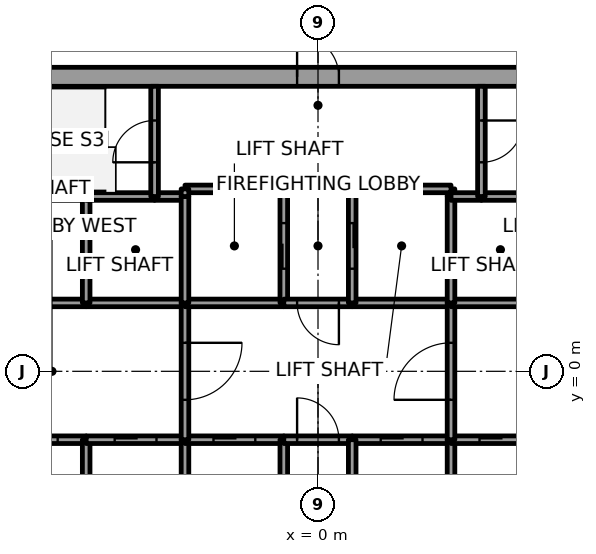
"""IFC4 building model, lengths in metres.
Left out: names, types, materials, properties, quantities, classifications, styles, units other than length and angle.
Written with IfcOpenShell. Run it as: python <this file> out.ifc"""

import sys

from ifc_helpers import new_model, si_unit, direction, frame, frame_2d, origin, place, context, subcontext, project, spatial, rectangle, extrude, element, fill, save


model = new_model("IFC4")
c1 = context("Model", 3, precision=1e-05, world=origin(), true_north=direction((0.0, 1.0)))
c2 = subcontext(c1, "Body", "Model", "MODEL_VIEW")
j1 = project(units=[si_unit("LENGTHUNIT", "METRE"), si_unit("PLANEANGLEUNIT", "RADIAN")], contexts=[c1])
p1 = place(None, origin())
s1 = spatial("IfcSite", under=j1, at=p1, CompositionType="ELEMENT")
p2 = place(p1, origin())
s2 = spatial("IfcBuilding", under=s1, at=p2, CompositionType="ELEMENT")
p3 = place(p2, frame((0.0, 0.0, 177.8)))
s3 = spatial("IfcBuildingStorey", under=s2, at=p3, CompositionType="ELEMENT", Elevation=177.8)
p4 = place(p3, frame((-11.0, 7.75, 0.0), z_axis=(0.0, 0.0, 1.0), x_axis=(1.0, 0.0, 0.0)))
e1 = element("IfcWall", 1, at=p4, inside=s3, PredefinedType="SHEAR", context=c2, shape_type="SweptSolid", body=[
    extrude(rectangle(XDim=22.0, YDim=0.5, at=frame_2d((11.0, 0.0))), origin(), (0.0, 0.0, 1.0), 4.0),
])
p5 = place(p4, frame((10.45, 0.0, 0.0)))
e2 = element("IfcOpeningElement", 2, at=p5, cuts=e1, PredefinedType="OPENING", context=c2, shape_type="SweptSolid", body=[
    extrude(rectangle(XDim=1.1, YDim=2.1, at=frame_2d((0.55, 1.05))), frame((0.0, 0.25, 0.0), z_axis=(0.0, -1.0, 0.0), x_axis=(1.0, 0.0, 0.0)), (0.0, 0.0, 1.0), 0.5),
])
p6 = place(p3, frame((-8.7, -1.8, 0.0), z_axis=(0.0, 0.0, 1.0), x_axis=(1.0, 0.0, 0.0)))
e3 = element("IfcWall", 3, at=p6, inside=s3, PredefinedType="SOLIDWALL", context=c2, shape_type="SweptSolid", body=[
    extrude(rectangle(XDim=2.6, YDim=0.2, at=frame_2d((1.3, 0.0))), origin(), (0.0, 0.0, 1.0), 3.85),
])
p7 = place(p6, frame((0.75, 0.0, 0.0)))
e4 = element("IfcOpeningElement", 4, at=p7, cuts=e3, PredefinedType="OPENING", context=c2, shape_type="SweptSolid", body=[
    extrude(rectangle(XDim=1.1, YDim=2.1, at=frame_2d((0.55, 1.05))), frame((0.0, 0.1, 0.0), z_axis=(0.0, -1.0, 0.0), x_axis=(1.0, 0.0, 0.0)), (0.0, 0.0, 1.0), 0.2),
])
for number, where, z_axis, x_axis in (
    (5, (-6.1, 1.8, 0.0), (0.0, 0.0, 1.0), (-1.0, 0.0, 0.0)),
    (6, (-6.1, 4.6, 0.0), (0.0, 0.0, 1.0), (-1.0, 0.0, 0.0)),
):
    element("IfcWall", number, at=place(p3, frame(where, z_axis=z_axis, x_axis=x_axis)), inside=s3, PredefinedType="SOLIDWALL", context=c2, shape_type="SweptSolid", body=[
        extrude(rectangle(XDim=2.6, YDim=0.2, at=frame_2d((1.3, 0.0))), origin(), (0.0, 0.0, 1.0), 3.85),
    ])
p8 = place(p3, frame((-6.1, -4.6, 0.0), z_axis=(0.0, 0.0, 1.0), x_axis=(0.0, 1.0, 0.0)))
e7 = element("IfcWall", 7, at=p8, inside=s3, PredefinedType="SOLIDWALL", context=c2, shape_type="SweptSolid", body=[
    extrude(rectangle(XDim=2.8, YDim=0.2, at=frame_2d((1.4, 0.0))), origin(), (0.0, 0.0, 1.0), 3.85),
])
p9 = place(p3, frame((-6.1, -1.8, 0.0), z_axis=(0.0, 0.0, 1.0), x_axis=(1.0, 0.0, 0.0)))
e8 = element("IfcWall", 8, at=p9, inside=s3, PredefinedType="SOLIDWALL", context=c2, shape_type="SweptSolid", body=[
    extrude(rectangle(XDim=2.6, YDim=0.2, at=frame_2d((1.3, 0.0))), origin(), (0.0, 0.0, 1.0), 3.85),
])
p10 = place(p9, frame((0.75, 0.0, 0.0)))
e9 = element("IfcOpeningElement", 9, at=p10, cuts=e8, PredefinedType="OPENING", context=c2, shape_type="SweptSolid", body=[
    extrude(rectangle(XDim=1.1, YDim=2.1, at=frame_2d((0.55, 1.05))), frame((0.0, 0.1, 0.0), z_axis=(0.0, -1.0, 0.0), x_axis=(1.0, 0.0, 0.0)), (0.0, 0.0, 1.0), 0.2),
])
p11 = place(p3, frame((-3.5, 1.8, 0.0), z_axis=(0.0, 0.0, 1.0), x_axis=(-1.0, 0.0, 0.0)))
e10 = element("IfcWall", 10, at=p11, inside=s3, PredefinedType="SOLIDWALL", context=c2, shape_type="SweptSolid", body=[
    extrude(rectangle(XDim=2.6, YDim=0.2, at=frame_2d((1.3, 0.0))), origin(), (0.0, 0.0, 1.0), 3.85),
])
p12 = place(p3, frame((-6.1, 1.8, 0.0), z_axis=(0.0, 0.0, 1.0), x_axis=(0.0, 1.0, 0.0)))
e11 = element("IfcWall", 11, at=p12, inside=s3, PredefinedType="SOLIDWALL", context=c2, shape_type="SweptSolid", body=[
    extrude(rectangle(XDim=2.8, YDim=0.2, at=frame_2d((1.4, 0.0))), origin(), (0.0, 0.0, 1.0), 3.85),
])
p13 = place(p3, frame((-4.3, 4.6, 0.0), z_axis=(0.0, 0.0, 1.0), x_axis=(-1.0, 0.0, 0.0)))
e12 = element("IfcWall", 12, at=p13, inside=s3, PredefinedType="SOLIDWALL", context=c2, shape_type="SweptSolid", body=[
    extrude(rectangle(XDim=1.8, YDim=0.2, at=frame_2d((0.9, 0.0))), origin(), (0.0, 0.0, 1.0), 3.85),
])
p14 = place(p3, frame((-3.5, 4.6, 0.0), z_axis=(0.0, 0.0, 1.0), x_axis=(-1.0, 0.0, 0.0)))
e13 = element("IfcWall", 13, at=p14, inside=s3, PredefinedType="SOLIDWALL", context=c2, shape_type="SweptSolid", body=[
    extrude(rectangle(XDim=0.8, YDim=0.2, at=frame_2d((0.4, 0.0))), origin(), (0.0, 0.0, 1.0), 3.85),
])
p15 = place(p3, frame((-4.3, 4.6, 0.0), z_axis=(0.0, 0.0, 1.0), x_axis=(0.0, 1.0, 0.0)))
e14 = element("IfcWall", 14, at=p15, inside=s3, PredefinedType="SOLIDWALL", context=c2, shape_type="SweptSolid", body=[
    extrude(rectangle(XDim=2.9, YDim=0.2, at=frame_2d((1.45, 0.0))), origin(), (0.0, 0.0, 1.0), 3.85),
])
p16 = place(p15, frame((0.9, 0.0, 0.0)))
e15 = element("IfcOpeningElement", 15, at=p16, cuts=e14, PredefinedType="OPENING", context=c2, shape_type="SweptSolid", body=[
    extrude(rectangle(XDim=1.1, YDim=2.1, at=frame_2d((0.55, 1.05))), frame((0.0, 0.1, 0.0), z_axis=(0.0, -1.0, 0.0), x_axis=(1.0, 0.0, 0.0)), (0.0, 0.0, 1.0), 0.2),
])
p17 = place(p3, frame((-3.5, -4.6, 0.0), z_axis=(0.0, 0.0, 1.0), x_axis=(0.0, 1.0, 0.0)))
e16 = element("IfcWall", 16, at=p17, inside=s3, PredefinedType="SOLIDWALL", context=c2, shape_type="SweptSolid", body=[
    extrude(rectangle(XDim=2.8, YDim=0.2, at=frame_2d((1.4, 0.0))), origin(), (0.0, 0.0, 1.0), 3.85),
])
p18 = place(p3, frame((-3.5, -1.8, 0.0), z_axis=(0.0, 0.0, 1.0), x_axis=(1.0, 0.0, 0.0)))
e17 = element("IfcWall", 17, at=p18, inside=s3, PredefinedType="SOLIDWALL", context=c2, shape_type="SweptSolid", body=[
    extrude(rectangle(XDim=2.6, YDim=0.2, at=frame_2d((1.3, 0.0))), origin(), (0.0, 0.0, 1.0), 3.85),
])
p19 = place(p18, frame((0.75, 0.0, 0.0)))
e18 = element("IfcOpeningElement", 18, at=p19, cuts=e17, PredefinedType="OPENING", context=c2, shape_type="SweptSolid", body=[
    extrude(rectangle(XDim=1.1, YDim=2.1, at=frame_2d((0.55, 1.05))), frame((0.0, 0.1, 0.0), z_axis=(0.0, -1.0, 0.0), x_axis=(1.0, 0.0, 0.0)), (0.0, 0.0, 1.0), 0.2),
])
p20 = place(p3, frame((-3.5, 1.8, 0.0), z_axis=(0.0, 0.0, 1.0), x_axis=(0.0, -1.0, 0.0)))
e19 = element("IfcWall", 19, at=p20, inside=s3, PredefinedType="SOLIDWALL", context=c2, shape_type="SweptSolid", body=[
    extrude(rectangle(XDim=3.6, YDim=0.2, at=frame_2d((1.8, 0.0))), origin(), (0.0, 0.0, 1.0), 3.85),
])
p21 = place(p20, frame((1.05, 0.0, 0.0)))
e20 = element("IfcOpeningElement", 20, at=p21, cuts=e19, PredefinedType="OPENING", context=c2, shape_type="SweptSolid", body=[
    extrude(rectangle(XDim=1.5, YDim=2.1, at=frame_2d((0.75, 1.05))), frame((0.0, 0.1, 0.0), z_axis=(0.0, -1.0, 0.0), x_axis=(1.0, 0.0, 0.0)), (0.0, 0.0, 1.0), 0.2),
])
p22 = place(p3, frame((-0.9, 1.8, 0.0), z_axis=(0.0, 0.0, 1.0), x_axis=(-1.0, 0.0, 0.0)))
e21 = element("IfcWall", 21, at=p22, inside=s3, PredefinedType="SOLIDWALL", context=c2, shape_type="SweptSolid", body=[
    extrude(rectangle(XDim=2.6, YDim=0.2, at=frame_2d((1.3, 0.0))), origin(), (0.0, 0.0, 1.0), 3.85),
])
p23 = place(p3, frame((-3.5, 4.6, 0.0), z_axis=(0.0, 0.0, 1.0), x_axis=(0.0, -1.0, 0.0)))
e22 = element("IfcWall", 22, at=p23, inside=s3, PredefinedType="SOLIDWALL", context=c2, shape_type="SweptSolid", body=[
    extrude(rectangle(XDim=2.8, YDim=0.2, at=frame_2d((1.4, 0.0))), origin(), (0.0, 0.0, 1.0), 3.85),
])
p24 = place(p3, frame((-0.9, 1.8, 0.0), z_axis=(0.0, 0.0, 1.0), x_axis=(0.0, 1.0, 0.0)))
e23 = element("IfcWall", 23, at=p24, inside=s3, PredefinedType="SOLIDWALL", context=c2, shape_type="SweptSolid", body=[
    extrude(rectangle(XDim=3.0, YDim=0.2, at=frame_2d((1.5, 0.0))), origin(), (0.0, 0.0, 1.0), 3.85),
])
p25 = place(p24, frame((0.9, 0.0, 0.0)))
e24 = element("IfcOpeningElement", 24, at=p25, cuts=e23, PredefinedType="OPENING", context=c2, shape_type="SweptSolid", body=[
    extrude(rectangle(XDim=1.2, YDim=2.1, at=frame_2d((0.6, 1.05))), frame((0.0, 0.1, 0.0), z_axis=(0.0, -1.0, 0.0), x_axis=(1.0, 0.0, 0.0)), (0.0, 0.0, 1.0), 0.2),
])
p26 = place(p3, frame((-0.9, 4.8, 0.0), z_axis=(0.0, 0.0, 1.0), x_axis=(-1.0, 0.0, 0.0)))
e25 = element("IfcWall", 25, at=p26, inside=s3, PredefinedType="SOLIDWALL", context=c2, shape_type="SweptSolid", body=[
    extrude(rectangle(XDim=2.6, YDim=0.2, at=frame_2d((1.3, 0.0))), origin(), (0.0, 0.0, 1.0), 3.85),
])
p27 = place(p3, frame((-3.5, 4.8, 0.0), z_axis=(0.0, 0.0, 1.0), x_axis=(0.0, -1.0, 0.0)))
e26 = element("IfcWall", 26, at=p27, inside=s3, PredefinedType="SOLIDWALL", context=c2, shape_type="SweptSolid", body=[
    extrude(rectangle(XDim=0.2, YDim=0.2, at=frame_2d((0.1, 0.0))), origin(), (0.0, 0.0, 1.0), 3.85),
])
p28 = place(p3, frame((-0.9, -4.6, 0.0), z_axis=(0.0, 0.0, 1.0), x_axis=(0.0, 1.0, 0.0)))
e27 = element("IfcWall", 27, at=p28, inside=s3, PredefinedType="SOLIDWALL", context=c2, shape_type="SweptSolid", body=[
    extrude(rectangle(XDim=2.8, YDim=0.2, at=frame_2d((1.4, 0.0))), origin(), (0.0, 0.0, 1.0), 3.85),
])
p29 = place(p3, frame((-0.9, -1.8, 0.0), z_axis=(0.0, 0.0, 1.0), x_axis=(1.0, 0.0, 0.0)))
e28 = element("IfcWall", 28, at=p29, inside=s3, PredefinedType="SOLIDWALL", context=c2, shape_type="SweptSolid", body=[
    extrude(rectangle(XDim=1.8, YDim=0.2, at=frame_2d((0.9, 0.0))), origin(), (0.0, 0.0, 1.0), 3.85),
])
p30 = place(p29, frame((0.35, 0.0, 0.0)))
e29 = element("IfcOpeningElement", 29, at=p30, cuts=e28, PredefinedType="OPENING", context=c2, shape_type="SweptSolid", body=[
    extrude(rectangle(XDim=1.1, YDim=2.1, at=frame_2d((0.55, 1.05))), frame((0.0, 0.1, 0.0), z_axis=(0.0, -1.0, 0.0), x_axis=(1.0, 0.0, 0.0)), (0.0, 0.0, 1.0), 0.2),
])
p31 = place(p3, frame((0.9, 1.8, 0.0), z_axis=(0.0, 0.0, 1.0), x_axis=(-1.0, 0.0, 0.0)))
e30 = element("IfcWall", 30, at=p31, inside=s3, PredefinedType="SOLIDWALL", context=c2, shape_type="SweptSolid", body=[
    extrude(rectangle(XDim=1.8, YDim=0.2, at=frame_2d((0.9, 0.0))), origin(), (0.0, 0.0, 1.0), 3.85),
])
p32 = place(p31, frame((0.35, 0.0, 0.0)))
e31 = element("IfcOpeningElement", 31, at=p32, cuts=e30, PredefinedType="OPENING", context=c2, shape_type="SweptSolid", body=[
    extrude(rectangle(XDim=1.1, YDim=2.1, at=frame_2d((0.55, 1.05))), frame((0.0, 0.1, 0.0), z_axis=(0.0, -1.0, 0.0), x_axis=(1.0, 0.0, 0.0)), (0.0, 0.0, 1.0), 0.2),
])
p33 = place(p3, frame((0.9, -1.8, 0.0), z_axis=(0.0, 0.0, 1.0), x_axis=(1.0, 0.0, 0.0)))
e32 = element("IfcWall", 32, at=p33, inside=s3, PredefinedType="SOLIDWALL", context=c2, shape_type="SweptSolid", body=[
    extrude(rectangle(XDim=2.6, YDim=0.2, at=frame_2d((1.3, 0.0))), origin(), (0.0, 0.0, 1.0), 3.85),
])
p34 = place(p33, frame((0.75, 0.0, 0.0)))
e33 = element("IfcOpeningElement", 33, at=p34, cuts=e32, PredefinedType="OPENING", context=c2, shape_type="SweptSolid", body=[
    extrude(rectangle(XDim=1.1, YDim=2.1, at=frame_2d((0.55, 1.05))), frame((0.0, 0.1, 0.0), z_axis=(0.0, -1.0, 0.0), x_axis=(1.0, 0.0, 0.0)), (0.0, 0.0, 1.0), 0.2),
])
p35 = place(p3, frame((0.9, -1.8, 0.0), z_axis=(0.0, 0.0, 1.0), x_axis=(0.0, -1.0, 0.0)))
e34 = element("IfcWall", 34, at=p35, inside=s3, PredefinedType="SOLIDWALL", context=c2, shape_type="SweptSolid", body=[
    extrude(rectangle(XDim=2.8, YDim=0.2, at=frame_2d((1.4, 0.0))), origin(), (0.0, 0.0, 1.0), 3.85),
])
p36 = place(p3, frame((3.5, 1.8, 0.0), z_axis=(0.0, 0.0, 1.0), x_axis=(-1.0, 0.0, 0.0)))
e35 = element("IfcWall", 35, at=p36, inside=s3, PredefinedType="SOLIDWALL", context=c2, shape_type="SweptSolid", body=[
    extrude(rectangle(XDim=2.6, YDim=0.2, at=frame_2d((1.3, 0.0))), origin(), (0.0, 0.0, 1.0), 3.85),
])
p37 = place(p3, frame((3.5, 4.6, 0.0), z_axis=(0.0, 0.0, 1.0), x_axis=(0.0, 1.0, 0.0)))
e36 = element("IfcWall", 36, at=p37, inside=s3, PredefinedType="SOLIDWALL", context=c2, shape_type="SweptSolid", body=[
    extrude(rectangle(XDim=0.2, YDim=0.2, at=frame_2d((0.1, 0.0))), origin(), (0.0, 0.0, 1.0), 3.85),
])
p38 = place(p3, frame((3.5, 4.8, 0.0), z_axis=(0.0, 0.0, 1.0), x_axis=(-1.0, 0.0, 0.0)))
e37 = element("IfcWall", 37, at=p38, inside=s3, PredefinedType="SOLIDWALL", context=c2, shape_type="SweptSolid", body=[
    extrude(rectangle(XDim=2.6, YDim=0.2, at=frame_2d((1.3, 0.0))), origin(), (0.0, 0.0, 1.0), 3.85),
])
p39 = place(p3, frame((0.9, 4.8, 0.0), z_axis=(0.0, 0.0, 1.0), x_axis=(0.0, -1.0, 0.0)))
e38 = element("IfcWall", 38, at=p39, inside=s3, PredefinedType="SOLIDWALL", context=c2, shape_type="SweptSolid", body=[
    extrude(rectangle(XDim=3.0, YDim=0.2, at=frame_2d((1.5, 0.0))), origin(), (0.0, 0.0, 1.0), 3.85),
])
p40 = place(p39, frame((0.9, 0.0, 0.0)))
e39 = element("IfcOpeningElement", 39, at=p40, cuts=e38, PredefinedType="OPENING", context=c2, shape_type="SweptSolid", body=[
    extrude(rectangle(XDim=1.2, YDim=2.1, at=frame_2d((0.6, 1.05))), frame((0.0, 0.1, 0.0), z_axis=(0.0, -1.0, 0.0), x_axis=(1.0, 0.0, 0.0)), (0.0, 0.0, 1.0), 0.2),
])
p41 = place(p3, frame((3.5, -4.6, 0.0), z_axis=(0.0, 0.0, 1.0), x_axis=(0.0, 1.0, 0.0)))
e40 = element("IfcWall", 40, at=p41, inside=s3, PredefinedType="SOLIDWALL", context=c2, shape_type="SweptSolid", body=[
    extrude(rectangle(XDim=2.8, YDim=0.2, at=frame_2d((1.4, 0.0))), origin(), (0.0, 0.0, 1.0), 3.85),
])
p42 = place(p3, frame((3.5, -1.8, 0.0), z_axis=(0.0, 0.0, 1.0), x_axis=(1.0, 0.0, 0.0)))
e41 = element("IfcWall", 41, at=p42, inside=s3, PredefinedType="SOLIDWALL", context=c2, shape_type="SweptSolid", body=[
    extrude(rectangle(XDim=2.6, YDim=0.2, at=frame_2d((1.3, 0.0))), origin(), (0.0, 0.0, 1.0), 3.85),
])
p43 = place(p42, frame((0.75, 0.0, 0.0)))
e42 = element("IfcOpeningElement", 42, at=p43, cuts=e41, PredefinedType="OPENING", context=c2, shape_type="SweptSolid", body=[
    extrude(rectangle(XDim=1.1, YDim=2.1, at=frame_2d((0.55, 1.05))), frame((0.0, 0.1, 0.0), z_axis=(0.0, -1.0, 0.0), x_axis=(1.0, 0.0, 0.0)), (0.0, 0.0, 1.0), 0.2),
])
p44 = place(p3, frame((3.5, -1.8, 0.0), z_axis=(0.0, 0.0, 1.0), x_axis=(0.0, 1.0, 0.0)))
e43 = element("IfcWall", 43, at=p44, inside=s3, PredefinedType="SOLIDWALL", context=c2, shape_type="SweptSolid", body=[
    extrude(rectangle(XDim=3.6, YDim=0.2, at=frame_2d((1.8, 0.0))), origin(), (0.0, 0.0, 1.0), 3.85),
])
p45 = place(p44, frame((1.05, 0.0, 0.0)))
e44 = element("IfcOpeningElement", 44, at=p45, cuts=e43, PredefinedType="OPENING", context=c2, shape_type="SweptSolid", body=[
    extrude(rectangle(XDim=1.5, YDim=2.1, at=frame_2d((0.75, 1.05))), frame((0.0, 0.1, 0.0), z_axis=(0.0, -1.0, 0.0), x_axis=(1.0, 0.0, 0.0)), (0.0, 0.0, 1.0), 0.2),
])
p46 = place(p3, frame((6.1, 1.8, 0.0), z_axis=(0.0, 0.0, 1.0), x_axis=(-1.0, 0.0, 0.0)))
e45 = element("IfcWall", 45, at=p46, inside=s3, PredefinedType="SOLIDWALL", context=c2, shape_type="SweptSolid", body=[
    extrude(rectangle(XDim=2.6, YDim=0.2, at=frame_2d((1.3, 0.0))), origin(), (0.0, 0.0, 1.0), 3.85),
])
p47 = place(p3, frame((3.5, 1.8, 0.0), z_axis=(0.0, 0.0, 1.0), x_axis=(0.0, 1.0, 0.0)))
e46 = element("IfcWall", 46, at=p47, inside=s3, PredefinedType="SOLIDWALL", context=c2, shape_type="SweptSolid", body=[
    extrude(rectangle(XDim=2.8, YDim=0.2, at=frame_2d((1.4, 0.0))), origin(), (0.0, 0.0, 1.0), 3.85),
])
p48 = place(p3, frame((4.3, 4.6, 0.0), z_axis=(0.0, 0.0, 1.0), x_axis=(-1.0, 0.0, 0.0)))
e47 = element("IfcWall", 47, at=p48, inside=s3, PredefinedType="SOLIDWALL", context=c2, shape_type="SweptSolid", body=[
    extrude(rectangle(XDim=0.8, YDim=0.2, at=frame_2d((0.4, 0.0))), origin(), (0.0, 0.0, 1.0), 3.85),
])
p49 = place(p3, frame((6.1, 4.6, 0.0), z_axis=(0.0, 0.0, 1.0), x_axis=(-1.0, 0.0, 0.0)))
e48 = element("IfcWall", 48, at=p49, inside=s3, PredefinedType="SOLIDWALL", context=c2, shape_type="SweptSolid", body=[
    extrude(rectangle(XDim=1.8, YDim=0.2, at=frame_2d((0.9, 0.0))), origin(), (0.0, 0.0, 1.0), 3.85),
])
p50 = place(p3, frame((4.3, 7.5, 0.0), z_axis=(0.0, 0.0, 1.0), x_axis=(0.0, -1.0, 0.0)))
e49 = element("IfcWall", 49, at=p50, inside=s3, PredefinedType="SOLIDWALL", context=c2, shape_type="SweptSolid", body=[
    extrude(rectangle(XDim=2.9, YDim=0.2, at=frame_2d((1.45, 0.0))), origin(), (0.0, 0.0, 1.0), 3.85),
])
p51 = place(p50, frame((0.9, 0.0, 0.0)))
e50 = element("IfcOpeningElement", 50, at=p51, cuts=e49, PredefinedType="OPENING", context=c2, shape_type="SweptSolid", body=[
    extrude(rectangle(XDim=1.1, YDim=2.1, at=frame_2d((0.55, 1.05))), frame((0.0, 0.1, 0.0), z_axis=(0.0, -1.0, 0.0), x_axis=(1.0, 0.0, 0.0)), (0.0, 0.0, 1.0), 0.2),
])
p52 = place(p7, origin())
e51 = element("IfcDoor", 51, at=p52, inside=s3, OperationType="SLIDING_TO_LEFT", PredefinedType="DOOR", context=c2, shape_type="SweptSolid", body=[
    extrude(rectangle(XDim=1.1, YDim=2.1, at=frame_2d((0.55, 1.05))), frame((0.0, 0.025, 0.0), z_axis=(0.0, -1.0, 0.0), x_axis=(1.0, 0.0, 0.0)), (0.0, 0.0, 1.0), 0.05),
])
fill(e4, e51)
p53 = place(p10, origin())
e52 = element("IfcDoor", 52, at=p53, inside=s3, OperationType="SLIDING_TO_LEFT", PredefinedType="DOOR", context=c2, shape_type="SweptSolid", body=[
    extrude(rectangle(XDim=1.1, YDim=2.1, at=frame_2d((0.55, 1.05))), frame((0.0, 0.025, 0.0), z_axis=(0.0, -1.0, 0.0), x_axis=(1.0, 0.0, 0.0)), (0.0, 0.0, 1.0), 0.05),
])
fill(e9, e52)
p54 = place(p19, origin())
e53 = element("IfcDoor", 53, at=p54, inside=s3, OperationType="SLIDING_TO_LEFT", PredefinedType="DOOR", context=c2, shape_type="SweptSolid", body=[
    extrude(rectangle(XDim=1.1, YDim=2.1, at=frame_2d((0.55, 1.05))), frame((0.0, 0.025, 0.0), z_axis=(0.0, -1.0, 0.0), x_axis=(1.0, 0.0, 0.0)), (0.0, 0.0, 1.0), 0.05),
])
fill(e18, e53)
p55 = place(p34, origin())
e54 = element("IfcDoor", 54, at=p55, inside=s3, OperationType="SLIDING_TO_RIGHT", PredefinedType="DOOR", context=c2, shape_type="SweptSolid", body=[
    extrude(rectangle(XDim=1.1, YDim=2.1, at=frame_2d((0.55, 1.05))), frame((0.0, 0.025, 0.0), z_axis=(0.0, -1.0, 0.0), x_axis=(1.0, 0.0, 0.0)), (0.0, 0.0, 1.0), 0.05),
])
fill(e33, e54)
p56 = place(p43, origin())
e55 = element("IfcDoor", 55, at=p56, inside=s3, OperationType="SLIDING_TO_LEFT", PredefinedType="DOOR", context=c2, shape_type="SweptSolid", body=[
    extrude(rectangle(XDim=1.1, YDim=2.1, at=frame_2d((0.55, 1.05))), frame((0.0, 0.025, 0.0), z_axis=(0.0, -1.0, 0.0), x_axis=(1.0, 0.0, 0.0)), (0.0, 0.0, 1.0), 0.05),
])
fill(e42, e55)
p57 = place(p25, origin())
e56 = element("IfcDoor", 56, at=p57, inside=s3, OperationType="SLIDING_TO_RIGHT", PredefinedType="DOOR", context=c2, shape_type="SweptSolid", body=[
    extrude(rectangle(XDim=1.2, YDim=2.1, at=frame_2d((0.6, 1.05))), frame((0.0, 0.025, 0.0), z_axis=(0.0, -1.0, 0.0), x_axis=(1.0, 0.0, 0.0)), (0.0, 0.0, 1.0), 0.05),
])
fill(e24, e56)
p58 = place(p40, origin())
e57 = element("IfcDoor", 57, at=p58, inside=s3, OperationType="SLIDING_TO_LEFT", PredefinedType="DOOR", context=c2, shape_type="SweptSolid", body=[
    extrude(rectangle(XDim=1.2, YDim=2.1, at=frame_2d((0.6, 1.05))), frame((0.0, 0.025, 0.0), z_axis=(0.0, -1.0, 0.0), x_axis=(1.0, 0.0, 0.0)), (0.0, 0.0, 1.0), 0.05),
])
fill(e39, e57)
p59 = place(p21, origin())
e58 = element("IfcDoor", 58, at=p59, inside=s3, OperationType="DOUBLE_DOOR_SINGLE_SWING", PredefinedType="DOOR", context=c2, shape_type="SweptSolid", body=[
    extrude(rectangle(XDim=1.5, YDim=2.1, at=frame_2d((0.75, 1.05))), frame((0.0, 0.025, 0.0), z_axis=(0.0, -1.0, 0.0), x_axis=(1.0, 0.0, 0.0)), (0.0, 0.0, 1.0), 0.05),
])
fill(e20, e58)
p60 = place(p45, origin())
e59 = element("IfcDoor", 59, at=p60, inside=s3, OperationType="DOUBLE_DOOR_SINGLE_SWING", PredefinedType="DOOR", context=c2, shape_type="SweptSolid", body=[
    extrude(rectangle(XDim=1.5, YDim=2.1, at=frame_2d((0.75, 1.05))), frame((0.0, 0.025, 0.0), z_axis=(0.0, -1.0, 0.0), x_axis=(1.0, 0.0, 0.0)), (0.0, 0.0, 1.0), 0.05),
])
fill(e44, e59)
p61 = place(p32, origin())
e60 = element("IfcDoor", 60, at=p61, inside=s3, OperationType="SINGLE_SWING_RIGHT", PredefinedType="DOOR", context=c2, shape_type="SweptSolid", body=[
    extrude(rectangle(XDim=1.1, YDim=2.1, at=frame_2d((0.55, 1.05))), frame((0.0, 0.025, 0.0), z_axis=(0.0, -1.0, 0.0), x_axis=(1.0, 0.0, 0.0)), (0.0, 0.0, 1.0), 0.05),
])
fill(e31, e60)
p62 = place(p30, origin())
e61 = element("IfcDoor", 61, at=p62, inside=s3, OperationType="SINGLE_SWING_LEFT", PredefinedType="DOOR", context=c2, shape_type="SweptSolid", body=[
    extrude(rectangle(XDim=1.1, YDim=2.1, at=frame_2d((0.55, 1.05))), frame((0.0, 0.025, 0.0), z_axis=(0.0, -1.0, 0.0), x_axis=(1.0, 0.0, 0.0)), (0.0, 0.0, 1.0), 0.05),
])
fill(e29, e61)
p63 = place(p16, origin())
e62 = element("IfcDoor", 62, at=p63, inside=s3, OperationType="SINGLE_SWING_LEFT", PredefinedType="DOOR", context=c2, shape_type="SweptSolid", body=[
    extrude(rectangle(XDim=1.1, YDim=2.1, at=frame_2d((0.55, 1.05))), frame((0.0, 0.025, 0.0), z_axis=(0.0, -1.0, 0.0), x_axis=(1.0, 0.0, 0.0)), (0.0, 0.0, 1.0), 0.05),
])
fill(e15, e62)
p64 = place(p51, origin())
e63 = element("IfcDoor", 63, at=p64, inside=s3, OperationType="SINGLE_SWING_RIGHT", PredefinedType="DOOR", context=c2, shape_type="SweptSolid", body=[
    extrude(rectangle(XDim=1.1, YDim=2.1, at=frame_2d((0.55, 1.05))), frame((0.0, 0.025, 0.0), z_axis=(0.0, -1.0, 0.0), x_axis=(1.0, 0.0, 0.0)), (0.0, 0.0, 1.0), 0.05),
])
fill(e50, e63)
p65 = place(p5, origin())
e64 = element("IfcDoor", 64, at=p65, inside=s3, OperationType="SINGLE_SWING_RIGHT", PredefinedType="DOOR", context=c2, shape_type="SweptSolid", body=[
    extrude(rectangle(XDim=1.1, YDim=2.1, at=frame_2d((0.55, 1.05))), frame((0.0, 0.025, 0.0), z_axis=(0.0, -1.0, 0.0), x_axis=(1.0, 0.0, 0.0)), (0.0, 0.0, 1.0), 0.05),
])
fill(e2, e64)
save(model, sys.argv[1])
